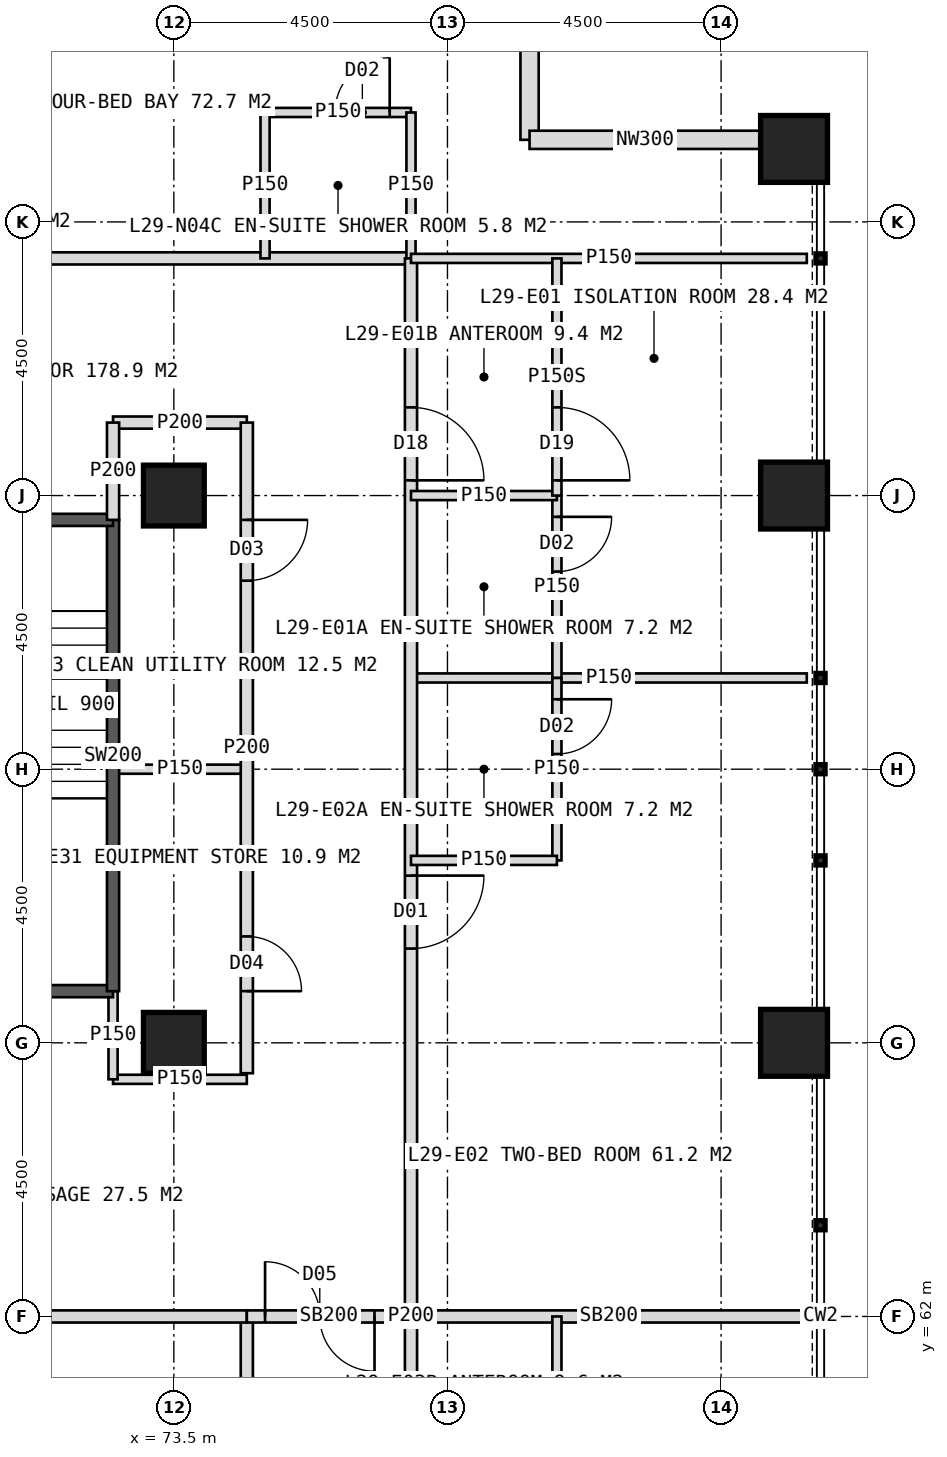
"""IFC4 building model, lengths in metres.
Left out: names, types, materials, properties, quantities, classifications, styles, units other than length and angle.
Written with IfcOpenShell. Run it as: python <this file> out.ifc"""

import sys

from ifc_helpers import new_model, si_unit, direction, frame, frame_2d, origin, origin_2d, place, context, subcontext, project, spatial, rectangle, hollow_rectangle, extrude, element, fill, save


model = new_model("IFC4")
c1 = context("Model", 3, precision=1e-05, world=origin(), true_north=direction((0.0, 1.0)))
c2 = subcontext(c1, "Body", "Model", "MODEL_VIEW")
j1 = project(units=[si_unit("LENGTHUNIT", "METRE"), si_unit("PLANEANGLEUNIT", "RADIAN")], contexts=[c1])
p1 = place(None, origin())
s1 = spatial("IfcSite", under=j1, at=p1, CompositionType="ELEMENT")
p2 = place(p1, origin())
s2 = spatial("IfcBuilding", under=s1, at=p2, CompositionType="ELEMENT")
p3 = place(p2, frame((0.0, 0.0, 124.0)))
s3 = spatial("IfcBuildingStorey", under=s2, at=p3, CompositionType="ELEMENT", Elevation=124.0)
for number, where, z_axis, x_axis in (
    (1, (73.5, 75.5, 0.0), (0.0, 0.0, 1.0), (1.0, 0.0, 0.0)),
    (2, (73.5, 66.5, 0.0), (0.0, 0.0, 1.0), (1.0, 0.0, 0.0)),
):
    element("IfcColumn", number, at=place(p3, frame(where, z_axis=z_axis, x_axis=x_axis)), inside=s3, PredefinedType="COLUMN", context=c2, shape_type="SweptSolid", body=[
        extrude(hollow_rectangle(XDim=1.0, YDim=1.0, WallThickness=0.1, at=origin_2d()), origin(), (0.0, 0.0, 1.0), 4.0),
    ])
for number, where, z_axis, x_axis in (
    (3, (83.7, 66.5, 0.0), (0.0, 0.0, 1.0), (1.0, 0.0, 0.0)),
    (4, (83.7, 75.5, 0.0), (0.0, 0.0, 1.0), (1.0, 0.0, 0.0)),
    (5, (83.7, 81.2, 0.0), (0.0, 0.0, 1.0), (1.0, 0.0, 0.0)),
):
    element("IfcColumn", number, at=place(p3, frame(where, z_axis=z_axis, x_axis=x_axis)), inside=s3, PredefinedType="COLUMN", context=c2, shape_type="SweptSolid", body=[
        extrude(hollow_rectangle(XDim=1.1, YDim=1.1, WallThickness=0.1, at=origin_2d()), origin(), (0.0, 0.0, 1.0), 4.0),
    ])
for number, where, z_axis, x_axis in (
    (6, (79.35, 85.15, 0.0), (0.0, 0.0, 1.0), (0.0, -1.0, 0.0)),
    (7, (79.35, 81.35, 0.0), (0.0, 0.0, 1.0), (1.0, 0.0, 0.0)),
):
    element("IfcWall", number, at=place(p3, frame(where, z_axis=z_axis, x_axis=x_axis)), inside=s3, PredefinedType="ELEMENTEDWALL", context=c2, shape_type="SweptSolid", body=[
        extrude(rectangle(XDim=3.8, YDim=0.3, at=frame_2d((1.9, 0.0))), origin(), (0.0, 0.0, 1.0), 4.0),
    ])
p4 = place(p3, frame((42.6, 79.4, 0.0), z_axis=(0.0, 0.0, 1.0), x_axis=(1.0, 0.0, 0.0)))
e8 = element("IfcWall", 8, at=p4, inside=s3, PredefinedType="PARTITIONING", context=c2, shape_type="SweptSolid", body=[
    extrude(rectangle(XDim=34.8, YDim=0.2, at=frame_2d((17.4, 0.0))), origin(), (0.0, 0.0, 1.0), 3.75),
])
p5 = place(p4, frame((2.45, 0.0, 0.0)))
e9 = element("IfcOpeningElement", 9, at=p5, cuts=e8, PredefinedType="OPENING", context=c2, shape_type="SweptSolid", body=[
    extrude(rectangle(XDim=1.2, YDim=2.2, at=frame_2d((0.6, 1.1))), frame((0.0, 0.11, 0.0), z_axis=(0.0, -1.0, 0.0), x_axis=(1.0, 0.0, 0.0)), (0.0, 0.0, 1.0), 0.22),
])
p6 = place(p4, frame((10.15, 0.0, 0.0)))
e10 = element("IfcOpeningElement", 10, at=p6, cuts=e8, PredefinedType="OPENING", context=c2, shape_type="SweptSolid", body=[
    extrude(rectangle(XDim=1.2, YDim=2.2, at=frame_2d((0.6, 1.1))), frame((0.0, 0.11, 0.0), z_axis=(0.0, -1.0, 0.0), x_axis=(1.0, 0.0, 0.0)), (0.0, 0.0, 1.0), 0.22),
])
p7 = place(p4, frame((19.8, 0.0, 0.0)))
e11 = element("IfcOpeningElement", 11, at=p7, cuts=e8, PredefinedType="OPENING", context=c2, shape_type="SweptSolid", body=[
    extrude(rectangle(XDim=1.2, YDim=2.2, at=frame_2d((0.6, 1.1))), frame((0.0, 0.11, 0.0), z_axis=(0.0, -1.0, 0.0), x_axis=(1.0, 0.0, 0.0)), (0.0, 0.0, 1.0), 0.22),
])
p8 = place(p4, frame((27.55, 0.0, 0.0)))
e12 = element("IfcOpeningElement", 12, at=p8, cuts=e8, PredefinedType="OPENING", context=c2, shape_type="SweptSolid", body=[
    extrude(rectangle(XDim=1.2, YDim=2.2, at=frame_2d((0.6, 1.1))), frame((0.0, 0.11, 0.0), z_axis=(0.0, -1.0, 0.0), x_axis=(1.0, 0.0, 0.0)), (0.0, 0.0, 1.0), 0.22),
])
p9 = place(p3, frame((75.0, 81.8, 0.0), z_axis=(0.0, 0.0, 1.0), x_axis=(1.0, 0.0, 0.0)))
e13 = element("IfcWall", 13, at=p9, inside=s3, PredefinedType="PARTITIONING", context=c2, shape_type="SweptSolid", body=[
    extrude(rectangle(XDim=2.4, YDim=0.15, at=frame_2d((1.2, 0.0))), origin(), (0.0, 0.0, 1.0), 3.75),
])
p10 = place(p9, frame((1.15, 0.0, 0.0)))
e14 = element("IfcOpeningElement", 14, at=p10, cuts=e13, PredefinedType="OPENING", context=c2, shape_type="SweptSolid", body=[
    extrude(rectangle(XDim=0.9, YDim=2.1, at=frame_2d((0.45, 1.05))), frame((0.0, 0.085, 0.0), z_axis=(0.0, -1.0, 0.0), x_axis=(1.0, 0.0, 0.0)), (0.0, 0.0, 1.0), 0.17),
])
for number, where, z_axis, x_axis in (
    (15, (75.0, 79.4, 0.0), (0.0, 0.0, 1.0), (0.0, 1.0, 0.0)),
    (16, (77.4, 79.4, 0.0), (0.0, 0.0, 1.0), (0.0, 1.0, 0.0)),
):
    element("IfcWall", number, at=place(p3, frame(where, z_axis=z_axis, x_axis=x_axis)), inside=s3, PredefinedType="PARTITIONING", context=c2, shape_type="SweptSolid", body=[
        extrude(rectangle(XDim=2.4, YDim=0.15, at=frame_2d((1.2, 0.0))), origin(), (0.0, 0.0, 1.0), 3.75),
    ])
p11 = place(p3, frame((72.5, 76.7, 0.0), z_axis=(0.0, 0.0, 1.0), x_axis=(1.0, 0.0, 0.0)))
e17 = element("IfcWall", 17, at=p11, inside=s3, PredefinedType="PARTITIONING", context=c2, shape_type="SweptSolid", body=[
    extrude(rectangle(XDim=2.2, YDim=0.2, at=frame_2d((1.1, 0.0))), origin(), (0.0, 0.0, 1.0), 3.75),
])
p12 = place(p3, frame((77.4, 72.5, 0.0), z_axis=(0.0, 0.0, 1.0), x_axis=(1.0, 0.0, 0.0)))
e18 = element("IfcWall", 18, at=p12, inside=s3, PredefinedType="PARTITIONING", context=c2, shape_type="SweptSolid", body=[
    extrude(rectangle(XDim=6.51, YDim=0.15, at=frame_2d((3.255, 0.0))), origin(), (0.0, 0.0, 1.0), 3.75),
])
p13 = place(p3, frame((77.4, 62.0, 0.0), z_axis=(0.0, 0.0, 1.0), x_axis=(1.0, 0.0, 0.0)))
e19 = element("IfcWall", 19, at=p13, inside=s3, PredefinedType="SOLIDWALL", context=c2, shape_type="SweptSolid", body=[
    extrude(rectangle(XDim=6.51, YDim=0.2, at=frame_2d((3.255, 0.0))), origin(), (0.0, 0.0, 1.0), 2.95),
])
p14 = place(p3, frame((77.4, 79.4, 0.0), z_axis=(0.0, 0.0, 1.0), x_axis=(0.0, -1.0, 0.0)))
e20 = element("IfcWall", 20, at=p14, inside=s3, PredefinedType="PARTITIONING", context=c2, shape_type="SweptSolid", body=[
    extrude(rectangle(XDim=34.8, YDim=0.2, at=frame_2d((17.4, 0.0))), origin(), (0.0, 0.0, 1.0), 3.75),
])
p15 = place(p14, frame((2.45, 0.0, 0.0)))
e21 = element("IfcOpeningElement", 21, at=p15, cuts=e20, PredefinedType="OPENING", context=c2, shape_type="SweptSolid", body=[
    extrude(rectangle(XDim=1.2, YDim=2.2, at=frame_2d((0.6, 1.1))), frame((0.0, 0.11, 0.0), z_axis=(0.0, -1.0, 0.0), x_axis=(1.0, 0.0, 0.0)), (0.0, 0.0, 1.0), 0.22),
])
p16 = place(p14, frame((10.15, 0.0, 0.0)))
e22 = element("IfcOpeningElement", 22, at=p16, cuts=e20, PredefinedType="OPENING", context=c2, shape_type="SweptSolid", body=[
    extrude(rectangle(XDim=1.2, YDim=2.2, at=frame_2d((0.6, 1.1))), frame((0.0, 0.11, 0.0), z_axis=(0.0, -1.0, 0.0), x_axis=(1.0, 0.0, 0.0)), (0.0, 0.0, 1.0), 0.22),
])
p17 = place(p14, frame((19.55, 0.0, 0.0)))
e23 = element("IfcOpeningElement", 23, at=p17, cuts=e20, PredefinedType="OPENING", context=c2, shape_type="SweptSolid", body=[
    extrude(rectangle(XDim=1.2, YDim=2.2, at=frame_2d((0.6, 1.1))), frame((0.0, 0.11, 0.0), z_axis=(0.0, -1.0, 0.0), x_axis=(1.0, 0.0, 0.0)), (0.0, 0.0, 1.0), 0.22),
])
p18 = place(p14, frame((26.05, 0.0, 0.0)))
e24 = element("IfcOpeningElement", 24, at=p18, cuts=e20, PredefinedType="OPENING", context=c2, shape_type="SweptSolid", body=[
    extrude(rectangle(XDim=1.2, YDim=2.2, at=frame_2d((0.6, 1.1))), frame((0.0, 0.11, 0.0), z_axis=(0.0, -1.0, 0.0), x_axis=(1.0, 0.0, 0.0)), (0.0, 0.0, 1.0), 0.22),
])
p19 = place(p3, frame((77.4, 79.4, 0.0), z_axis=(0.0, 0.0, 1.0), x_axis=(1.0, 0.0, 0.0)))
e25 = element("IfcWall", 25, at=p19, inside=s3, PredefinedType="PARTITIONING", context=c2, shape_type="SweptSolid", body=[
    extrude(rectangle(XDim=6.51, YDim=0.15, at=frame_2d((3.255, 0.0))), origin(), (0.0, 0.0, 1.0), 3.75),
])
p20 = place(p3, frame((79.8, 75.5, 0.0), z_axis=(0.0, 0.0, 1.0), x_axis=(0.0, -1.0, 0.0)))
e26 = element("IfcWall", 26, at=p20, inside=s3, PredefinedType="PARTITIONING", context=c2, shape_type="SweptSolid", body=[
    extrude(rectangle(XDim=3.0, YDim=0.15, at=frame_2d((1.5, 0.0))), origin(), (0.0, 0.0, 1.0), 3.75),
])
p21 = place(p20, frame((0.35, 0.0, 0.0)))
e27 = element("IfcOpeningElement", 27, at=p21, cuts=e26, PredefinedType="OPENING", context=c2, shape_type="SweptSolid", body=[
    extrude(rectangle(XDim=0.9, YDim=2.1, at=frame_2d((0.45, 1.05))), frame((0.0, 0.085, 0.0), z_axis=(0.0, -1.0, 0.0), x_axis=(1.0, 0.0, 0.0)), (0.0, 0.0, 1.0), 0.17),
])
p22 = place(p3, frame((77.4, 75.5, 0.0), z_axis=(0.0, 0.0, 1.0), x_axis=(1.0, 0.0, 0.0)))
e28 = element("IfcWall", 28, at=p22, inside=s3, PredefinedType="PARTITIONING", context=c2, shape_type="SweptSolid", body=[
    extrude(rectangle(XDim=2.4, YDim=0.15, at=frame_2d((1.2, 0.0))), origin(), (0.0, 0.0, 1.0), 2.95),
])
p23 = place(p3, frame((79.8, 79.4, 0.0), z_axis=(0.0, 0.0, 1.0), x_axis=(0.0, -1.0, 0.0)))
e29 = element("IfcWall", 29, at=p23, inside=s3, PredefinedType="PARTITIONING", context=c2, shape_type="SweptSolid", body=[
    extrude(rectangle(XDim=3.9, YDim=0.15, at=frame_2d((1.95, 0.0))), origin(), (0.0, 0.0, 1.0), 3.75),
])
p24 = place(p23, frame((2.45, 0.0, 0.0)))
e30 = element("IfcOpeningElement", 30, at=p24, cuts=e29, PredefinedType="OPENING", context=c2, shape_type="SweptSolid", body=[
    extrude(rectangle(XDim=1.2, YDim=2.2, at=frame_2d((0.6, 1.1))), frame((0.0, 0.085, 0.0), z_axis=(0.0, -1.0, 0.0), x_axis=(1.0, 0.0, 0.0)), (0.0, 0.0, 1.0), 0.17),
])
p25 = place(p3, frame((79.8, 72.5, 0.0), z_axis=(0.0, 0.0, 1.0), x_axis=(0.0, -1.0, 0.0)))
e31 = element("IfcWall", 31, at=p25, inside=s3, PredefinedType="PARTITIONING", context=c2, shape_type="SweptSolid", body=[
    extrude(rectangle(XDim=3.0, YDim=0.15, at=frame_2d((1.5, 0.0))), origin(), (0.0, 0.0, 1.0), 3.75),
])
p26 = place(p25, frame((0.35, 0.0, 0.0)))
e32 = element("IfcOpeningElement", 32, at=p26, cuts=e31, PredefinedType="OPENING", context=c2, shape_type="SweptSolid", body=[
    extrude(rectangle(XDim=0.9, YDim=2.1, at=frame_2d((0.45, 1.05))), frame((0.0, 0.085, 0.0), z_axis=(0.0, -1.0, 0.0), x_axis=(1.0, 0.0, 0.0)), (0.0, 0.0, 1.0), 0.17),
])
p27 = place(p3, frame((77.4, 69.5, 0.0), z_axis=(0.0, 0.0, 1.0), x_axis=(1.0, 0.0, 0.0)))
e33 = element("IfcWall", 33, at=p27, inside=s3, PredefinedType="PARTITIONING", context=c2, shape_type="SweptSolid", body=[
    extrude(rectangle(XDim=2.4, YDim=0.15, at=frame_2d((1.2, 0.0))), origin(), (0.0, 0.0, 1.0), 3.75),
])
p28 = place(p3, frame((79.8, 62.0, 0.0), z_axis=(0.0, 0.0, 1.0), x_axis=(0.0, -1.0, 0.0)))
e34 = element("IfcWall", 34, at=p28, inside=s3, PredefinedType="PARTITIONING", context=c2, shape_type="SweptSolid", body=[
    extrude(rectangle(XDim=3.6, YDim=0.15, at=frame_2d((1.8, 0.0))), origin(), (0.0, 0.0, 1.0), 3.75),
])
p29 = place(p28, frame((2.15, 0.0, 0.0)))
e35 = element("IfcOpeningElement", 35, at=p29, cuts=e34, PredefinedType="OPENING", context=c2, shape_type="SweptSolid", body=[
    extrude(rectangle(XDim=1.2, YDim=2.2, at=frame_2d((0.6, 1.1))), frame((0.0, 0.085, 0.0), z_axis=(0.0, -1.0, 0.0), x_axis=(1.0, 0.0, 0.0)), (0.0, 0.0, 1.0), 0.17),
])
p30 = place(p3, frame((72.5, 71.0, 0.0), z_axis=(0.0, 0.0, 1.0), x_axis=(1.0, 0.0, 0.0)))
e36 = element("IfcWall", 36, at=p30, inside=s3, PredefinedType="PARTITIONING", context=c2, shape_type="SweptSolid", body=[
    extrude(rectangle(XDim=2.2, YDim=0.15, at=frame_2d((1.1, 0.0))), origin(), (0.0, 0.0, 1.0), 3.75),
])
p31 = place(p3, frame((74.7, 76.7, 0.0), z_axis=(0.0, 0.0, 1.0), x_axis=(0.0, -1.0, 0.0)))
e37 = element("IfcWall", 37, at=p31, inside=s3, PredefinedType="PARTITIONING", context=c2, shape_type="SweptSolid", body=[
    extrude(rectangle(XDim=10.7, YDim=0.2, at=frame_2d((5.35, 0.0))), origin(), (0.0, 0.0, 1.0), 3.75),
])
p32 = place(p31, frame((1.6, 0.0, 0.0)))
e38 = element("IfcOpeningElement", 38, at=p32, cuts=e37, PredefinedType="OPENING", context=c2, shape_type="SweptSolid", body=[
    extrude(rectangle(XDim=1.0, YDim=2.1, at=frame_2d((0.5, 1.05))), frame((0.0, 0.11, 0.0), z_axis=(0.0, -1.0, 0.0), x_axis=(1.0, 0.0, 0.0)), (0.0, 0.0, 1.0), 0.22),
])
p33 = place(p31, frame((8.45, 0.0, 0.0)))
e39 = element("IfcOpeningElement", 39, at=p33, cuts=e37, PredefinedType="OPENING", context=c2, shape_type="SweptSolid", body=[
    extrude(rectangle(XDim=0.9, YDim=2.1, at=frame_2d((0.45, 1.05))), frame((0.0, 0.11, 0.0), z_axis=(0.0, -1.0, 0.0), x_axis=(1.0, 0.0, 0.0)), (0.0, 0.0, 1.0), 0.22),
])
p34 = place(p3, frame((74.7, 62.0, 0.0), z_axis=(0.0, 0.0, 1.0), x_axis=(0.0, -1.0, 0.0)))
e40 = element("IfcWall", 40, at=p34, inside=s3, PredefinedType="PARTITIONING", context=c2, shape_type="SweptSolid", body=[
    extrude(rectangle(XDim=14.7, YDim=0.2, at=frame_2d((7.35, 0.0))), origin(), (0.0, 0.0, 1.0), 3.75),
])
p35 = place(p34, frame((1.45, 0.0, 0.0)))
e41 = element("IfcOpeningElement", 41, at=p35, cuts=e40, PredefinedType="OPENING", context=c2, shape_type="SweptSolid", body=[
    extrude(rectangle(XDim=1.0, YDim=2.1, at=frame_2d((0.5, 1.05))), frame((0.0, 0.11, 0.0), z_axis=(0.0, -1.0, 0.0), x_axis=(1.0, 0.0, 0.0)), (0.0, 0.0, 1.0), 0.22),
])
p36 = place(p34, frame((11.35, 0.0, 0.0)))
e42 = element("IfcOpeningElement", 42, at=p36, cuts=e40, PredefinedType="OPENING", context=c2, shape_type="SweptSolid", body=[
    extrude(rectangle(XDim=1.0, YDim=2.1, at=frame_2d((0.5, 1.05))), frame((0.0, 0.11, 0.0), z_axis=(0.0, -1.0, 0.0), x_axis=(1.0, 0.0, 0.0)), (0.0, 0.0, 1.0), 0.22),
])
p37 = place(p3, frame((72.5, 65.9, 0.0), z_axis=(0.0, 0.0, 1.0), x_axis=(1.0, 0.0, 0.0)))
e43 = element("IfcWall", 43, at=p37, inside=s3, PredefinedType="PARTITIONING", context=c2, shape_type="SweptSolid", body=[
    extrude(rectangle(XDim=2.2, YDim=0.15, at=frame_2d((1.1, 0.0))), origin(), (0.0, 0.0, 1.0), 3.75),
])
p38 = place(p3, frame((69.0, 62.0, 0.0), z_axis=(0.0, 0.0, 1.0), x_axis=(1.0, 0.0, 0.0)))
e44 = element("IfcWall", 44, at=p38, inside=s3, PredefinedType="SOLIDWALL", context=c2, shape_type="SweptSolid", body=[
    extrude(rectangle(XDim=5.7, YDim=0.2, at=frame_2d((2.85, 0.0))), origin(), (0.0, 0.0, 1.0), 2.95),
])
p39 = place(p3, frame((74.7, 62.0, 0.0), z_axis=(0.0, 0.0, 1.0), x_axis=(1.0, 0.0, 0.0)))
e45 = element("IfcWall", 45, at=p39, inside=s3, PredefinedType="SOLIDWALL", context=c2, shape_type="SweptSolid", body=[
    extrude(rectangle(XDim=2.7, YDim=0.2, at=frame_2d((1.35, 0.0))), origin(), (0.0, 0.0, 1.0), 2.95),
])
p40 = place(p39, frame((0.3, 0.0, 0.0)))
e46 = element("IfcOpeningElement", 46, at=p40, cuts=e45, PredefinedType="OPENING", context=c2, shape_type="SweptSolid", body=[
    extrude(rectangle(XDim=1.8, YDim=2.2, at=frame_2d((0.9, 1.1))), frame((0.0, 0.11, 0.0), z_axis=(0.0, -1.0, 0.0), x_axis=(1.0, 0.0, 0.0)), (0.0, 0.0, 1.0), 0.22),
])
p41 = place(p3, frame((72.5, 65.9, 0.0), z_axis=(0.0, 0.0, 1.0), x_axis=(0.0, 1.0, 0.0)))
e47 = element("IfcWall", 47, at=p41, inside=s3, PredefinedType="PARTITIONING", context=c2, shape_type="SweptSolid", body=[
    extrude(rectangle(XDim=1.45, YDim=0.15, at=frame_2d((0.725, 0.0))), origin(), (0.0, 0.0, 1.0), 3.75),
])
p42 = place(p3, frame((69.0, 67.35, 0.0), z_axis=(0.0, 0.0, 1.0), x_axis=(1.0, 0.0, 0.0)))
e48 = element("IfcWall", 48, at=p42, inside=s3, PredefinedType="SOLIDWALL", context=c2, shape_type="SweptSolid", body=[
    extrude(rectangle(XDim=3.5, YDim=0.2, at=frame_2d((1.75, 0.0))), origin(), (0.0, 0.0, 1.0), 3.75),
])
p43 = place(p3, frame((72.5, 67.35, 0.0), z_axis=(0.0, 0.0, 1.0), x_axis=(0.0, 1.0, 0.0)))
e49 = element("IfcWall", 49, at=p43, inside=s3, PredefinedType="SOLIDWALL", context=c2, shape_type="SweptSolid", body=[
    extrude(rectangle(XDim=7.75, YDim=0.2, at=frame_2d((3.875, 0.0))), origin(), (0.0, 0.0, 1.0), 3.75),
])
p44 = place(p3, frame((69.0, 75.1, 0.0), z_axis=(0.0, 0.0, 1.0), x_axis=(1.0, 0.0, 0.0)))
e50 = element("IfcWall", 50, at=p44, inside=s3, PredefinedType="SOLIDWALL", context=c2, shape_type="SweptSolid", body=[
    extrude(rectangle(XDim=3.5, YDim=0.2, at=frame_2d((1.75, 0.0))), origin(), (0.0, 0.0, 1.0), 3.75),
])
p45 = place(p44, frame((1.15, 0.0, 0.0)))
e51 = element("IfcOpeningElement", 51, at=p45, cuts=e50, PredefinedType="OPENING", context=c2, shape_type="SweptSolid", body=[
    extrude(rectangle(XDim=1.2, YDim=2.1, at=frame_2d((0.6, 1.05))), frame((0.0, 0.11, 0.0), z_axis=(0.0, -1.0, 0.0), x_axis=(1.0, 0.0, 0.0)), (0.0, 0.0, 1.0), 0.22),
])
p46 = place(p3, frame((72.5, 75.1, 0.0), z_axis=(0.0, 0.0, 1.0), x_axis=(0.0, 1.0, 0.0)))
e52 = element("IfcWall", 52, at=p46, inside=s3, PredefinedType="PARTITIONING", context=c2, shape_type="SweptSolid", body=[
    extrude(rectangle(XDim=1.6, YDim=0.2, at=frame_2d((0.8, 0.0))), origin(), (0.0, 0.0, 1.0), 3.75),
])
p47 = place(p10, origin())
e53 = element("IfcDoor", 53, at=p47, inside=s3, OperationType="SINGLE_SWING_RIGHT", PredefinedType="DOOR", context=c2, shape_type="SweptSolid", body=[
    extrude(rectangle(XDim=0.9, YDim=2.1, at=frame_2d((0.45, 1.05))), frame((0.0, 0.025, 0.0), z_axis=(0.0, -1.0, 0.0), x_axis=(1.0, 0.0, 0.0)), (0.0, 0.0, 1.0), 0.05),
])
fill(e14, e53)
p48 = place(p32, origin())
e54 = element("IfcDoor", 54, at=p48, inside=s3, OperationType="SINGLE_SWING_LEFT", PredefinedType="DOOR", context=c2, shape_type="SweptSolid", body=[
    extrude(rectangle(XDim=1.0, YDim=2.1, at=frame_2d((0.5, 1.05))), frame((0.0, 0.025, 0.0), z_axis=(0.0, -1.0, 0.0), x_axis=(1.0, 0.0, 0.0)), (0.0, 0.0, 1.0), 0.05),
])
fill(e38, e54)
p49 = place(p24, origin())
e55 = element("IfcDoor", 55, at=p49, inside=s3, OperationType="SINGLE_SWING_RIGHT", PredefinedType="DOOR", context=c2, shape_type="SweptSolid", body=[
    extrude(rectangle(XDim=1.2, YDim=2.2, at=frame_2d((0.6, 1.1))), frame((0.0, 0.025, 0.0), z_axis=(0.0, -1.0, 0.0), x_axis=(1.0, 0.0, 0.0)), (0.0, 0.0, 1.0), 0.05),
])
fill(e30, e55)
p50 = place(p15, origin())
e56 = element("IfcDoor", 56, at=p50, inside=s3, OperationType="SINGLE_SWING_RIGHT", PredefinedType="DOOR", context=c2, shape_type="SweptSolid", body=[
    extrude(rectangle(XDim=1.2, YDim=2.2, at=frame_2d((0.6, 1.1))), frame((0.0, 0.025, 0.0), z_axis=(0.0, -1.0, 0.0), x_axis=(1.0, 0.0, 0.0)), (0.0, 0.0, 1.0), 0.05),
])
fill(e21, e56)
p51 = place(p21, origin())
e57 = element("IfcDoor", 57, at=p51, inside=s3, OperationType="SINGLE_SWING_LEFT", PredefinedType="DOOR", context=c2, shape_type="SweptSolid", body=[
    extrude(rectangle(XDim=0.9, YDim=2.1, at=frame_2d((0.45, 1.05))), frame((0.0, 0.025, 0.0), z_axis=(0.0, -1.0, 0.0), x_axis=(1.0, 0.0, 0.0)), (0.0, 0.0, 1.0), 0.05),
])
fill(e27, e57)
p52 = place(p16, origin())
e58 = element("IfcDoor", 58, at=p52, inside=s3, OperationType="SINGLE_SWING_LEFT", PredefinedType="DOOR", context=c2, shape_type="SweptSolid", body=[
    extrude(rectangle(XDim=1.2, YDim=2.2, at=frame_2d((0.6, 1.1))), frame((0.0, 0.025, 0.0), z_axis=(0.0, -1.0, 0.0), x_axis=(1.0, 0.0, 0.0)), (0.0, 0.0, 1.0), 0.05),
])
fill(e22, e58)
p53 = place(p26, origin())
e59 = element("IfcDoor", 59, at=p53, inside=s3, OperationType="SINGLE_SWING_LEFT", PredefinedType="DOOR", context=c2, shape_type="SweptSolid", body=[
    extrude(rectangle(XDim=0.9, YDim=2.1, at=frame_2d((0.45, 1.05))), frame((0.0, 0.025, 0.0), z_axis=(0.0, -1.0, 0.0), x_axis=(1.0, 0.0, 0.0)), (0.0, 0.0, 1.0), 0.05),
])
fill(e32, e59)
p54 = place(p33, origin())
e60 = element("IfcDoor", 60, at=p54, inside=s3, OperationType="SINGLE_SWING_RIGHT", PredefinedType="DOOR", context=c2, shape_type="SweptSolid", body=[
    extrude(rectangle(XDim=0.9, YDim=2.1, at=frame_2d((0.45, 1.05))), frame((0.0, 0.025, 0.0), z_axis=(0.0, -1.0, 0.0), x_axis=(1.0, 0.0, 0.0)), (0.0, 0.0, 1.0), 0.05),
])
fill(e39, e60)
p55 = place(p40, origin())
e61 = element("IfcDoor", 61, at=p55, inside=s3, OperationType="DOUBLE_DOOR_DOUBLE_SWING", PredefinedType="DOOR", context=c2, shape_type="SweptSolid", body=[
    extrude(rectangle(XDim=1.8, YDim=2.2, at=frame_2d((0.9, 1.1))), frame((0.0, 0.025, 0.0), z_axis=(0.0, -1.0, 0.0), x_axis=(1.0, 0.0, 0.0)), (0.0, 0.0, 1.0), 0.05),
])
fill(e46, e61)
save(model, sys.argv[1])
